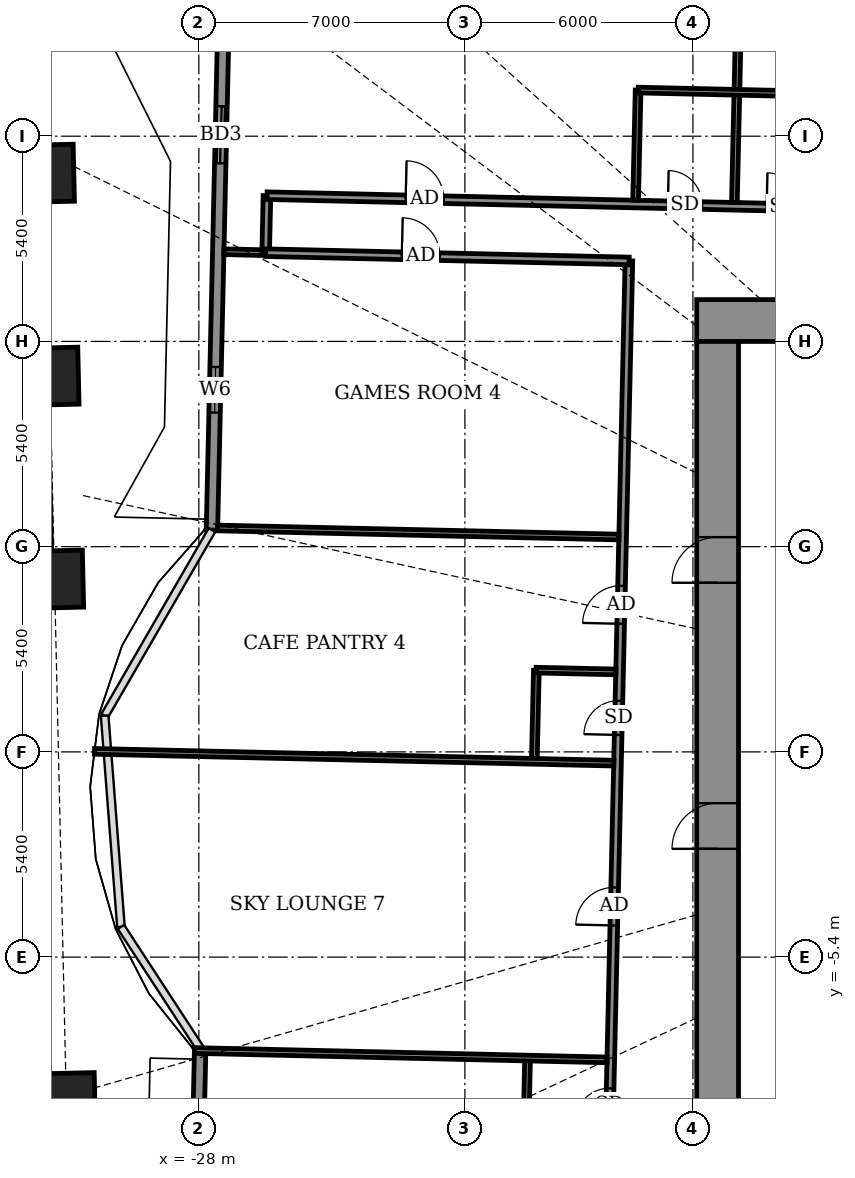
"""IFC4 building model, lengths in metres.
Left out: names, types, materials, properties, quantities, classifications, styles, units other than length and angle.
Written with IfcOpenShell. Run it as: python <this file> out.ifc"""

import sys

from ifc_helpers import new_model, si_unit, direction, frame, frame_2d, origin, origin_2d, place, context, subcontext, project, spatial, rectangle, extrude, element, fill, save


model = new_model("IFC4")
c1 = context("Model", 3, precision=1e-05, world=origin(), true_north=direction((0.0, 1.0)))
c2 = subcontext(c1, "Body", "Model", "MODEL_VIEW")
j1 = project(units=[si_unit("LENGTHUNIT", "METRE"), si_unit("PLANEANGLEUNIT", "RADIAN")], contexts=[c1])
p1 = place(None, origin())
s1 = spatial("IfcSite", under=j1, at=p1, CompositionType="ELEMENT")
p2 = place(p1, origin())
s2 = spatial("IfcBuilding", under=s1, at=p2, CompositionType="ELEMENT")
p3 = place(p2, frame((0.0, 0.0, 52.1)))
s3 = spatial("IfcBuildingStorey", under=s2, at=p3, CompositionType="ELEMENT", Elevation=52.1)
for number, where, z_axis, x_axis in (
    (1, (-31.486, -9.205, -0.55), (0.0, 0.0, 1.0), (0.023, -1.0, 0.0)),
    (2, (-32.04, 15.222, -0.55), (0.0, 0.0, 1.0), (0.023, -1.0, 0.0)),
    (3, (-31.919, 9.882, -0.55), (0.0, 0.0, 1.0), (0.023, -1.0, 0.0)),
    (4, (-31.798, 4.542, -0.55), (0.0, 0.0, 1.0), (0.023, -1.0, 0.0)),
):
    element("IfcColumn", number, at=place(p3, frame(where, z_axis=z_axis, x_axis=x_axis)), inside=s3, PredefinedType="COLUMN", context=c2, shape_type="SweptSolid", body=[
        extrude(rectangle(XDim=1.5, YDim=1.5, at=origin_2d()), origin(), (0.0, 0.0, 1.0), 4.6),
    ])
p4 = place(p3, frame((-27.324, 20.462, 0.0), z_axis=(0.0, 0.0, 1.0), x_axis=(-0.022695628174, -0.999742421057, 0.0)))
e5 = element("IfcWall", 5, at=p4, inside=s3, PredefinedType="SOLIDWALL", context=c2, shape_type="SweptSolid", body=[
    extrude(rectangle(XDim=14.63, YDim=0.3, at=frame_2d((7.315, 0.0))), origin(), (0.0, 0.0, 1.0), 2.1),
])
p5 = place(p4, frame((3.475, 0.0, 0.0)))
e6 = element("IfcOpeningElement", 6, at=p5, cuts=e5, PredefinedType="OPENING", context=c2, shape_type="SweptSolid", body=[
    extrude(rectangle(XDim=1.5, YDim=2.0, at=frame_2d((0.75, 1.0))), frame((0.0, 0.16, 0.0), z_axis=(0.0, -1.0, 0.0), x_axis=(1.0, 0.0, 0.0)), (0.0, 0.0, 1.0), 0.32),
])
p6 = place(p4, frame((10.337, 0.0, 0.5)))
e7 = element("IfcOpeningElement", 7, at=p6, cuts=e5, PredefinedType="OPENING", context=c2, shape_type="SweptSolid", body=[
    extrude(rectangle(XDim=1.2, YDim=1.1, at=frame_2d((0.6, 0.55))), frame((0.0, 0.16, 0.0), z_axis=(0.0, -1.0, 0.0), x_axis=(1.0, 0.0, 0.0)), (0.0, 0.0, 1.0), 0.32),
])
p7 = place(p3, frame((-27.965, -7.802, 0.0), z_axis=(0.0, 0.0, 1.0), x_axis=(-0.02267786199, -0.999742824218, 0.0)))
e8 = element("IfcWall", 8, at=p7, inside=s3, PredefinedType="SOLIDWALL", context=c2, shape_type="SweptSolid", body=[
    extrude(rectangle(XDim=15.029, YDim=0.3, at=frame_2d((7.514, 0.0))), origin(), (0.0, 0.0, 1.0), 2.1),
])
p8 = place(p7, frame((2.067, 0.0, 0.0)))
e9 = element("IfcOpeningElement", 9, at=p8, cuts=e8, PredefinedType="OPENING", context=c2, shape_type="SweptSolid", body=[
    extrude(rectangle(XDim=1.5, YDim=2.0, at=frame_2d((0.75, 1.0))), frame((0.0, 0.16, 0.0), z_axis=(0.0, -1.0, 0.0), x_axis=(1.0, 0.0, 0.0)), (0.0, 0.0, 1.0), 0.32),
])
p9 = place(p7, frame((10.53, 0.0, 0.5)))
e10 = element("IfcOpeningElement", 10, at=p9, cuts=e8, PredefinedType="OPENING", context=c2, shape_type="SweptSolid", body=[
    extrude(rectangle(XDim=1.2, YDim=1.1, at=frame_2d((0.6, 0.55))), frame((0.0, 0.16, 0.0), z_axis=(0.0, -1.0, 0.0), x_axis=(1.0, 0.0, 0.0)), (0.0, 0.0, 1.0), 0.32),
])
p10 = place(p3, frame((-32.133, 4.547, 0.0), z_axis=(0.0, 0.0, 1.0), x_axis=(-0.02268812008, 0.999742591474, 0.0)))
e11 = element("IfcWall", 11, at=p10, inside=s3, PredefinedType="USERDEFINED", context=c2, shape_type="SweptSolid", body=[
    extrude(rectangle(XDim=15.162, YDim=0.55, at=frame_2d((7.581, 0.0))), origin(), (0.0, 0.0, 1.0), 0.8),
])
p11 = place(p3, frame((-17.287, -13.625, 0.0), z_axis=(0.0, 0.0, 1.0), x_axis=(0.022712214871, 0.999742044377, 0.0)))
e12 = element("IfcWall", 12, at=p11, inside=s3, PredefinedType="PARTITIONING", context=c2, shape_type="SweptSolid", body=[
    extrude(rectangle(XDim=26.551, YDim=0.2, at=frame_2d((13.275, 0.0))), origin(), (0.0, 0.0, 1.0), 2.1),
])
p12 = place(p11, frame((17.0, 0.0, 0.0)))
e13 = element("IfcOpeningElement", 13, at=p12, cuts=e12, PredefinedType="OPENING", context=c2, shape_type="SweptSolid", body=[
    extrude(rectangle(XDim=1.0, YDim=2.1, at=frame_2d((0.5, 1.05))), frame((0.0, 0.11, 0.0), z_axis=(0.0, -1.0, 0.0), x_axis=(1.0, 0.0, 0.0)), (0.0, 0.0, 1.0), 0.22),
])
p13 = place(p11, frame((14.075, 0.0, 0.0)))
e14 = element("IfcOpeningElement", 14, at=p13, cuts=e12, PredefinedType="OPENING", context=c2, shape_type="SweptSolid", body=[
    extrude(rectangle(XDim=0.9, YDim=2.1, at=frame_2d((0.45, 1.05))), frame((0.0, 0.11, 0.0), z_axis=(0.0, -1.0, 0.0), x_axis=(1.0, 0.0, 0.0)), (0.0, 0.0, 1.0), 0.22),
])
p14 = place(p11, frame((9.061, 0.0, 0.0)))
e15 = element("IfcOpeningElement", 15, at=p14, cuts=e12, PredefinedType="OPENING", context=c2, shape_type="SweptSolid", body=[
    extrude(rectangle(XDim=1.0, YDim=2.1, at=frame_2d((0.5, 1.05))), frame((0.0, 0.11, 0.0), z_axis=(0.0, -1.0, 0.0), x_axis=(1.0, 0.0, 0.0)), (0.0, 0.0, 1.0), 0.22),
])
p15 = place(p11, frame((1.062, 0.0, 0.0)))
e16 = element("IfcOpeningElement", 16, at=p15, cuts=e12, PredefinedType="OPENING", context=c2, shape_type="SweptSolid", body=[
    extrude(rectangle(XDim=1.0, YDim=2.1, at=frame_2d((0.5, 1.05))), frame((0.0, 0.11, 0.0), z_axis=(0.0, -1.0, 0.0), x_axis=(1.0, 0.0, 0.0)), (0.0, 0.0, 1.0), 0.22),
])
p16 = place(p11, frame((3.875, 0.0, 0.0)))
e17 = element("IfcOpeningElement", 17, at=p16, cuts=e12, PredefinedType="OPENING", context=c2, shape_type="SweptSolid", body=[
    extrude(rectangle(XDim=0.9, YDim=2.1, at=frame_2d((0.45, 1.05))), frame((0.0, 0.11, 0.0), z_axis=(0.0, -1.0, 0.0), x_axis=(1.0, 0.0, 0.0)), (0.0, 0.0, 1.0), 0.22),
])
p17 = place(p3, frame((-19.405, -10.451, 0.0), z_axis=(0.0, 0.0, 1.0), x_axis=(0.022781023197, 0.999740478815, 0.0)))
e18 = element("IfcWall", 18, at=p17, inside=s3, PredefinedType="PARTITIONING", context=c2, shape_type="SweptSolid", body=[
    extrude(rectangle(XDim=2.325, YDim=0.15, at=frame_2d((1.163, 0.0))), origin(), (0.0, 0.0, 1.0), 2.15),
])
p18 = place(p3, frame((-28.116, -7.857, 0.0), z_axis=(0.0, 0.0, 1.0), x_axis=(0.999741301527, -0.022744890004, 0.0)))
e19 = element("IfcWall", 19, at=p18, inside=s3, PredefinedType="PARTITIONING", context=c2, shape_type="SweptSolid", body=[
    extrude(rectangle(XDim=10.863, YDim=0.15, at=frame_2d((5.431, 0.0))), origin(), (0.0, 0.0, 1.0), 2.15),
])
p19 = place(p3, frame((-19.172, -0.178, 0.0), z_axis=(0.0, 0.0, 1.0), x_axis=(0.022895561926, 0.999737862264, 0.0)))
e20 = element("IfcWall", 20, at=p19, inside=s3, PredefinedType="PARTITIONING", context=c2, shape_type="SweptSolid", body=[
    extrude(rectangle(XDim=2.324, YDim=0.15, at=frame_2d((1.162, 0.0))), origin(), (0.0, 0.0, 1.0), 4.05),
])
p20 = place(p3, frame((-30.746, 0.014, 0.0), z_axis=(0.0, 0.0, 1.0), x_axis=(0.999743161503, -0.022662988066, 0.0)))
e21 = element("IfcWall", 21, at=p20, inside=s3, PredefinedType="PARTITIONING", context=c2, shape_type="SweptSolid", body=[
    extrude(rectangle(XDim=13.67, YDim=0.15, at=frame_2d((6.835, 0.0))), origin(), (0.0, 0.0, 1.0), 0.93),
])
p21 = place(p3, frame((-19.124, 2.151, 0.0), z_axis=(0.0, 0.0, 1.0), x_axis=(0.999750761464, -0.022325208909, 0.0)))
e22 = element("IfcWall", 22, at=p21, inside=s3, PredefinedType="PARTITIONING", context=c2, shape_type="SweptSolid", body=[
    extrude(rectangle(XDim=2.1, YDim=0.15, at=frame_2d((1.05, 0.0))), origin(), (0.0, 0.0, 1.0), 4.05),
])
p22 = place(p3, frame((-27.505, 5.892, 0.0), z_axis=(0.0, 0.0, 1.0), x_axis=(0.999743990669, -0.022626381091, 0.0)))
e23 = element("IfcWall", 23, at=p22, inside=s3, PredefinedType="PARTITIONING", context=c2, shape_type="SweptSolid", body=[
    extrude(rectangle(XDim=10.563, YDim=0.15, at=frame_2d((5.282, 0.0))), origin(), (0.0, 0.0, 1.0), 2.35),
])
p23 = place(p3, frame((-27.34, 13.16, 0.0), z_axis=(0.0, 0.0, 1.0), x_axis=(0.999745701647, -0.022550654924, 0.0)))
e24 = element("IfcWall", 24, at=p23, inside=s3, PredefinedType="PARTITIONING", context=c2, shape_type="SweptSolid", body=[
    extrude(rectangle(XDim=1.104, YDim=0.15, at=frame_2d((0.552, 0.0))), origin(), (0.0, 0.0, 1.0), 2.1),
])
p24 = place(p3, frame((-26.242, 13.135, 0.0), z_axis=(0.0, 0.0, 1.0), x_axis=(0.022617910375, 0.999744182344, 0.0)))
e25 = element("IfcWall", 25, at=p24, inside=s3, PredefinedType="PARTITIONING", context=c2, shape_type="SweptSolid", body=[
    extrude(rectangle(XDim=1.5, YDim=0.2, at=frame_2d((0.75, 0.0))), origin(), (0.0, 0.0, 1.0), 2.1),
])
p25 = place(p3, frame((-26.24, 13.135, 0.0), z_axis=(0.0, 0.0, 1.0), x_axis=(0.999742441439, -0.022694730362, 0.0)))
e26 = element("IfcWall", 26, at=p25, inside=s3, PredefinedType="PARTITIONING", context=c2, shape_type="SweptSolid", body=[
    extrude(rectangle(XDim=9.563, YDim=0.2, at=frame_2d((4.782, 0.0))), origin(), (0.0, 0.0, 1.0), 2.1),
])
p26 = place(p25, frame((3.582, 0.0, 0.0)))
e27 = element("IfcOpeningElement", 27, at=p26, cuts=e26, PredefinedType="OPENING", context=c2, shape_type="SweptSolid", body=[
    extrude(rectangle(XDim=1.0, YDim=2.1, at=frame_2d((0.5, 1.05))), frame((0.0, 0.11, 0.0), z_axis=(0.0, -1.0, 0.0), x_axis=(1.0, 0.0, 0.0)), (0.0, 0.0, 1.0), 0.22),
])
p27 = place(p3, frame((-26.206, 14.635, 0.0), z_axis=(0.0, 0.0, 1.0), x_axis=(0.999742550532, -0.022689924097, 0.0)))
e28 = element("IfcWall", 28, at=p27, inside=s3, PredefinedType="PARTITIONING", context=c2, shape_type="SweptSolid", body=[
    extrude(rectangle(XDim=53.025, YDim=0.2, at=frame_2d((26.512, 0.0))), origin(), (0.0, 0.0, 1.0), 2.1),
])
p28 = place(p27, frame((51.824, 0.0, 0.0)))
e29 = element("IfcOpeningElement", 29, at=p28, cuts=e28, PredefinedType="OPENING", context=c2, shape_type="SweptSolid", body=[
    extrude(rectangle(XDim=1.0, YDim=2.1, at=frame_2d((0.5, 1.05))), frame((0.0, 0.11, 0.0), z_axis=(0.0, -1.0, 0.0), x_axis=(1.0, 0.0, 0.0)), (0.0, 0.0, 1.0), 0.22),
])
p29 = place(p27, frame((48.1, 0.0, 0.0)))
e30 = element("IfcOpeningElement", 30, at=p29, cuts=e28, PredefinedType="OPENING", context=c2, shape_type="SweptSolid", body=[
    extrude(rectangle(XDim=0.9, YDim=2.1, at=frame_2d((0.45, 1.05))), frame((0.0, 0.11, 0.0), z_axis=(0.0, -1.0, 0.0), x_axis=(1.0, 0.0, 0.0)), (0.0, 0.0, 1.0), 0.22),
])
p30 = place(p27, frame((44.1, 0.0, 0.0)))
e31 = element("IfcOpeningElement", 31, at=p30, cuts=e28, PredefinedType="OPENING", context=c2, shape_type="SweptSolid", body=[
    extrude(rectangle(XDim=1.0, YDim=2.1, at=frame_2d((0.5, 1.05))), frame((0.0, 0.11, 0.0), z_axis=(0.0, -1.0, 0.0), x_axis=(1.0, 0.0, 0.0)), (0.0, 0.0, 1.0), 0.22),
])
p31 = place(p27, frame((40.2, 0.0, 0.0)))
e32 = element("IfcOpeningElement", 32, at=p31, cuts=e28, PredefinedType="OPENING", context=c2, shape_type="SweptSolid", body=[
    extrude(rectangle(XDim=0.9, YDim=2.1, at=frame_2d((0.45, 1.05))), frame((0.0, 0.11, 0.0), z_axis=(0.0, -1.0, 0.0), x_axis=(1.0, 0.0, 0.0)), (0.0, 0.0, 1.0), 0.22),
])
p32 = place(p27, frame((33.175, 0.0, 0.0)))
e33 = element("IfcOpeningElement", 33, at=p32, cuts=e28, PredefinedType="OPENING", context=c2, shape_type="SweptSolid", body=[
    extrude(rectangle(XDim=1.0, YDim=2.1, at=frame_2d((0.5, 1.05))), frame((0.0, 0.11, 0.0), z_axis=(0.0, -1.0, 0.0), x_axis=(1.0, 0.0, 0.0)), (0.0, 0.0, 1.0), 0.22),
])
p33 = place(p27, frame((37.7, 0.0, 0.0)))
e34 = element("IfcOpeningElement", 34, at=p33, cuts=e28, PredefinedType="OPENING", context=c2, shape_type="SweptSolid", body=[
    extrude(rectangle(XDim=0.9, YDim=2.1, at=frame_2d((0.45, 1.05))), frame((0.0, 0.11, 0.0), z_axis=(0.0, -1.0, 0.0), x_axis=(1.0, 0.0, 0.0)), (0.0, 0.0, 1.0), 0.22),
])
p34 = place(p27, frame((28.625, 0.0, 0.0)))
e35 = element("IfcOpeningElement", 35, at=p34, cuts=e28, PredefinedType="OPENING", context=c2, shape_type="SweptSolid", body=[
    extrude(rectangle(XDim=0.9, YDim=2.1, at=frame_2d((0.45, 1.05))), frame((0.0, 0.11, 0.0), z_axis=(0.0, -1.0, 0.0), x_axis=(1.0, 0.0, 0.0)), (0.0, 0.0, 1.0), 0.22),
])
p35 = place(p27, frame((21.15, 0.0, 0.0)))
e36 = element("IfcOpeningElement", 36, at=p35, cuts=e28, PredefinedType="OPENING", context=c2, shape_type="SweptSolid", body=[
    extrude(rectangle(XDim=0.9, YDim=2.1, at=frame_2d((0.45, 1.05))), frame((0.0, 0.11, 0.0), z_axis=(0.0, -1.0, 0.0), x_axis=(1.0, 0.0, 0.0)), (0.0, 0.0, 1.0), 0.22),
])
p36 = place(p27, frame((17.075, 0.0, 0.0)))
e37 = element("IfcOpeningElement", 37, at=p36, cuts=e28, PredefinedType="OPENING", context=c2, shape_type="SweptSolid", body=[
    extrude(rectangle(XDim=1.0, YDim=2.1, at=frame_2d((0.5, 1.05))), frame((0.0, 0.11, 0.0), z_axis=(0.0, -1.0, 0.0), x_axis=(1.0, 0.0, 0.0)), (0.0, 0.0, 1.0), 0.22),
])
p37 = place(p27, frame((13.15, 0.0, 0.0)))
e38 = element("IfcOpeningElement", 38, at=p37, cuts=e28, PredefinedType="OPENING", context=c2, shape_type="SweptSolid", body=[
    extrude(rectangle(XDim=0.9, YDim=2.1, at=frame_2d((0.45, 1.05))), frame((0.0, 0.11, 0.0), z_axis=(0.0, -1.0, 0.0), x_axis=(1.0, 0.0, 0.0)), (0.0, 0.0, 1.0), 0.22),
])
p38 = place(p27, frame((3.65, 0.0, 0.0)))
e39 = element("IfcOpeningElement", 39, at=p38, cuts=e28, PredefinedType="OPENING", context=c2, shape_type="SweptSolid", body=[
    extrude(rectangle(XDim=1.0, YDim=2.1, at=frame_2d((0.5, 1.05))), frame((0.0, 0.11, 0.0), z_axis=(0.0, -1.0, 0.0), x_axis=(1.0, 0.0, 0.0)), (0.0, 0.0, 1.0), 0.22),
])
p39 = place(p27, frame((10.55, 0.0, 0.0)))
e40 = element("IfcOpeningElement", 40, at=p39, cuts=e28, PredefinedType="OPENING", context=c2, shape_type="SweptSolid", body=[
    extrude(rectangle(XDim=0.9, YDim=2.1, at=frame_2d((0.45, 1.05))), frame((0.0, 0.11, 0.0), z_axis=(0.0, -1.0, 0.0), x_axis=(1.0, 0.0, 0.0)), (0.0, 0.0, 1.0), 0.22),
])
p40 = place(p3, frame((-16.508, 14.515, 0.0), z_axis=(0.0, 0.0, 1.0), x_axis=(0.022815112345, 0.999739701447, 0.0)))
e41 = element("IfcWall", 41, at=p40, inside=s3, PredefinedType="PARTITIONING", context=c2, shape_type="SweptSolid", body=[
    extrude(rectangle(XDim=2.9, YDim=0.15, at=frame_2d((1.45, 0.0))), origin(), (0.0, 0.0, 1.0), 2.1),
])
p41 = place(p3, frame((-13.909, 14.456, 0.0), z_axis=(0.0, 0.0, 1.0), x_axis=(0.022718280885, 0.999741906551, 0.0)))
e42 = element("IfcWall", 42, at=p41, inside=s3, PredefinedType="PARTITIONING", context=c2, shape_type="SweptSolid", body=[
    extrude(rectangle(XDim=10.65, YDim=0.15, at=frame_2d((5.325, 0.0))), origin(), (0.0, 0.0, 1.0), 2.35),
])
p42 = place(p3, frame((-16.44, 17.414, 0.0), z_axis=(0.0, 0.0, 1.0), x_axis=(0.999741811307, -0.022722471786, 0.0)))
e43 = element("IfcWall", 43, at=p42, inside=s3, PredefinedType="PARTITIONING", context=c2, shape_type="SweptSolid", body=[
    extrude(rectangle(XDim=5.2, YDim=0.15, at=frame_2d((2.6, 0.0))), origin(), (0.0, 0.0, 1.0), 4.05),
])
p43 = place(p3, frame((-14.9, 11.35, 0.0), z_axis=(0.0, 0.0, 1.0), x_axis=(1.0, 0.0, 0.0)))
e44 = element("IfcWall", 44, at=p43, inside=s3, PredefinedType="SHEAR", context=c2, shape_type="SweptSolid", body=[
    extrude(rectangle(XDim=29.8, YDim=1.1, at=frame_2d((14.9, 0.0))), origin(), (0.0, 0.0, 1.0), 4.6),
])
p44 = place(p3, frame((-14.35, -10.8, 0.0), z_axis=(0.0, 0.0, 1.0), x_axis=(0.0, 1.0, 0.0)))
e45 = element("IfcWall", 45, at=p44, inside=s3, PredefinedType="SHEAR", context=c2, shape_type="SweptSolid", body=[
    extrude(rectangle(XDim=21.6, YDim=1.1, at=frame_2d((10.8, 0.0))), origin(), (0.0, 0.0, 1.0), 4.6),
])
p45 = place(p44, frame((8.25, 0.0, 0.0)))
e46 = element("IfcOpeningElement", 46, at=p45, cuts=e45, PredefinedType="OPENING", context=c2, shape_type="SweptSolid", body=[
    extrude(rectangle(XDim=1.2, YDim=2.1, at=frame_2d((0.6, 1.05))), frame((0.0, 0.56, 0.0), z_axis=(0.0, -1.0, 0.0), x_axis=(1.0, 0.0, 0.0)), (0.0, 0.0, 1.0), 1.12),
])
p46 = place(p44, frame((15.25, 0.0, 0.0)))
e47 = element("IfcOpeningElement", 47, at=p46, cuts=e45, PredefinedType="OPENING", context=c2, shape_type="SweptSolid", body=[
    extrude(rectangle(XDim=1.2, YDim=2.1, at=frame_2d((0.6, 1.05))), frame((0.0, 0.56, 0.0), z_axis=(0.0, -1.0, 0.0), x_axis=(1.0, 0.0, 0.0)), (0.0, 0.0, 1.0), 1.12),
])
p47 = place(p5, origin())
e48 = element("IfcDoor", 48, at=p47, inside=s3, OperationType="SLIDING_TO_LEFT", PredefinedType="DOOR", context=c2, shape_type="SweptSolid", body=[
    extrude(rectangle(XDim=1.5, YDim=2.0, at=frame_2d((0.75, 1.0))), frame((0.0, 0.025, 0.0), z_axis=(0.0, -1.0, 0.0), x_axis=(1.0, 0.0, 0.0)), (0.0, 0.0, 1.0), 0.05),
])
fill(e6, e48)
p48 = place(p6, origin())
e49 = element("IfcWindow", 49, at=p48, inside=s3, PartitioningType="SINGLE_PANEL", PredefinedType="WINDOW", context=c2, shape_type="SweptSolid", body=[
    extrude(rectangle(XDim=1.2, YDim=1.1, at=frame_2d((0.6, 0.55))), frame((0.0, 0.03, 0.0), z_axis=(0.0, -1.0, 0.0), x_axis=(1.0, 0.0, 0.0)), (0.0, 0.0, 1.0), 0.06),
])
fill(e7, e49)
p49 = place(p37, origin())
e50 = element("IfcDoor", 50, at=p49, inside=s3, OperationType="SINGLE_SWING_RIGHT", PredefinedType="DOOR", context=c2, shape_type="SweptSolid", body=[
    extrude(rectangle(XDim=0.9, YDim=2.1, at=frame_2d((0.45, 1.05))), frame((0.0, 0.025, 0.0), z_axis=(0.0, -1.0, 0.0), x_axis=(1.0, 0.0, 0.0)), (0.0, 0.0, 1.0), 0.05),
])
fill(e38, e50)
p50 = place(p38, origin())
e51 = element("IfcDoor", 51, at=p50, inside=s3, OperationType="SINGLE_SWING_RIGHT", PredefinedType="DOOR", context=c2, shape_type="SweptSolid", body=[
    extrude(rectangle(XDim=1.0, YDim=2.1, at=frame_2d((0.5, 1.05))), frame((0.0, 0.025, 0.0), z_axis=(0.0, -1.0, 0.0), x_axis=(1.0, 0.0, 0.0)), (0.0, 0.0, 1.0), 0.05),
])
fill(e39, e51)
p51 = place(p39, origin())
e52 = element("IfcDoor", 52, at=p51, inside=s3, OperationType="SINGLE_SWING_LEFT", PredefinedType="DOOR", context=c2, shape_type="SweptSolid", body=[
    extrude(rectangle(XDim=0.9, YDim=2.1, at=frame_2d((0.45, 1.05))), frame((0.0, 0.025, 0.0), z_axis=(0.0, -1.0, 0.0), x_axis=(1.0, 0.0, 0.0)), (0.0, 0.0, 1.0), 0.05),
])
fill(e40, e52)
p52 = place(p26, origin())
e53 = element("IfcDoor", 53, at=p52, inside=s3, OperationType="SINGLE_SWING_LEFT", PredefinedType="DOOR", context=c2, shape_type="SweptSolid", body=[
    extrude(rectangle(XDim=1.0, YDim=2.1, at=frame_2d((0.5, 1.05))), frame((0.0, 0.025, 0.0), z_axis=(0.0, -1.0, 0.0), x_axis=(1.0, 0.0, 0.0)), (0.0, 0.0, 1.0), 0.05),
])
fill(e27, e53)
p53 = place(p12, origin())
e54 = element("IfcDoor", 54, at=p53, inside=s3, OperationType="SINGLE_SWING_RIGHT", PredefinedType="DOOR", context=c2, shape_type="SweptSolid", body=[
    extrude(rectangle(XDim=1.0, YDim=2.1, at=frame_2d((0.5, 1.05))), frame((0.0, 0.025, 0.0), z_axis=(0.0, -1.0, 0.0), x_axis=(1.0, 0.0, 0.0)), (0.0, 0.0, 1.0), 0.05),
])
fill(e13, e54)
p54 = place(p13, origin())
e55 = element("IfcDoor", 55, at=p54, inside=s3, OperationType="SINGLE_SWING_RIGHT", PredefinedType="DOOR", context=c2, shape_type="SweptSolid", body=[
    extrude(rectangle(XDim=0.9, YDim=2.1, at=frame_2d((0.45, 1.05))), frame((0.0, 0.025, 0.0), z_axis=(0.0, -1.0, 0.0), x_axis=(1.0, 0.0, 0.0)), (0.0, 0.0, 1.0), 0.05),
])
fill(e14, e55)
p55 = place(p14, origin())
e56 = element("IfcDoor", 56, at=p55, inside=s3, OperationType="SINGLE_SWING_LEFT", PredefinedType="DOOR", context=c2, shape_type="SweptSolid", body=[
    extrude(rectangle(XDim=1.0, YDim=2.1, at=frame_2d((0.5, 1.05))), frame((0.0, 0.025, 0.0), z_axis=(0.0, -1.0, 0.0), x_axis=(1.0, 0.0, 0.0)), (0.0, 0.0, 1.0), 0.05),
])
fill(e15, e56)
p56 = place(p16, origin())
e57 = element("IfcDoor", 57, at=p56, inside=s3, OperationType="SINGLE_SWING_LEFT", PredefinedType="DOOR", context=c2, shape_type="SweptSolid", body=[
    extrude(rectangle(XDim=0.9, YDim=2.1, at=frame_2d((0.45, 1.05))), frame((0.0, 0.025, 0.0), z_axis=(0.0, -1.0, 0.0), x_axis=(1.0, 0.0, 0.0)), (0.0, 0.0, 1.0), 0.05),
])
fill(e17, e57)
p57 = place(p45, origin())
e58 = element("IfcDoor", 58, at=p57, inside=s3, OperationType="DOUBLE_DOOR_SINGLE_SWING", PredefinedType="DOOR", context=c2, shape_type="SweptSolid", body=[
    extrude(rectangle(XDim=1.2, YDim=2.1, at=frame_2d((0.6, 1.05))), frame((0.0, 0.025, 0.0), z_axis=(0.0, -1.0, 0.0), x_axis=(1.0, 0.0, 0.0)), (0.0, 0.0, 1.0), 0.05),
])
fill(e46, e58)
p58 = place(p46, origin())
e59 = element("IfcDoor", 59, at=p58, inside=s3, OperationType="DOUBLE_DOOR_SINGLE_SWING", PredefinedType="DOOR", context=c2, shape_type="SweptSolid", body=[
    extrude(rectangle(XDim=1.2, YDim=2.1, at=frame_2d((0.6, 1.05))), frame((0.0, 0.025, 0.0), z_axis=(0.0, -1.0, 0.0), x_axis=(1.0, 0.0, 0.0)), (0.0, 0.0, 1.0), 0.05),
])
fill(e47, e59)
save(model, sys.argv[1])
